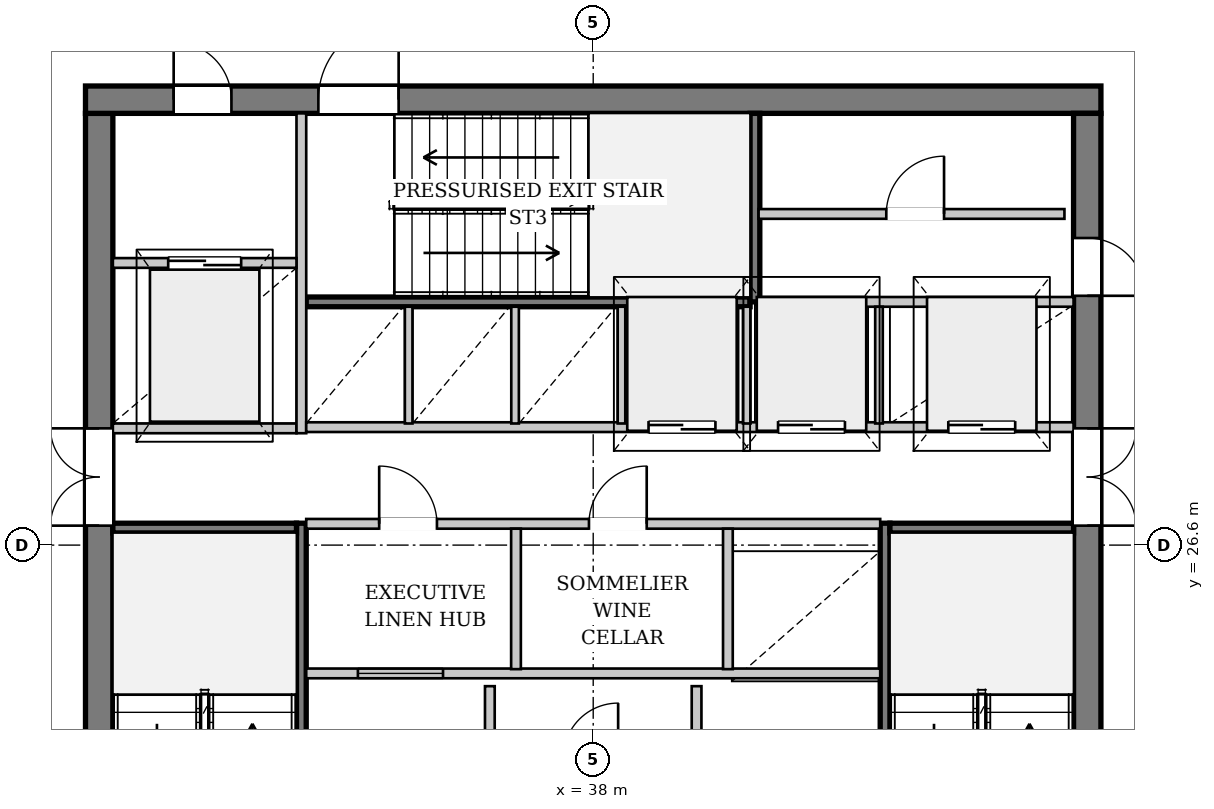
"""IFC4 building model, lengths in metres.
Left out: names, types, materials, properties, quantities, classifications, styles, units other than length and angle.
Written with IfcOpenShell. Run it as: python <this file> out.ifc"""

import sys

from ifc_helpers import new_model, si_unit, direction, frame, frame_2d, origin, place, context, subcontext, project, spatial, rectangle, extrude, source, transform, mapped, element, fill, save


model = new_model("IFC4")
c1 = context("Model", 3, precision=1e-05, world=origin(), true_north=direction((0.0, 1.0)))
c2 = subcontext(c1, "Body", "Model", "MODEL_VIEW")
j1 = project(units=[si_unit("LENGTHUNIT", "METRE"), si_unit("PLANEANGLEUNIT", "RADIAN")], contexts=[c1])
p1 = place(None, origin())
s1 = spatial("IfcSite", under=j1, at=p1, CompositionType="ELEMENT")
p2 = place(p1, origin())
s2 = spatial("IfcBuilding", under=s1, at=p2, CompositionType="ELEMENT")
p3 = place(p2, frame((0.0, 0.0, 277.7)))
s3 = spatial("IfcBuildingStorey", under=s2, at=p3, CompositionType="ELEMENT", Elevation=277.7)
p4 = place(p3, frame((50.997, 27.672, 0.0), z_axis=(0.0, 0.0, 1.0), x_axis=(-0.184819886047, -0.982772409931, 0.0)))
e1 = element("IfcWall", 1, at=p4, inside=s3, PredefinedType="SOLIDWALL", context=c2, shape_type="SweptSolid", body=[
    extrude(rectangle(XDim=22.053, YDim=0.32, at=frame_2d((11.027, 0.0))), origin(), (0.0, 0.0, 1.0), 3.462),
])
p5 = place(p4, frame((6.307, 0.0, 0.0)))
e2 = element("IfcOpeningElement", 2, at=p5, cuts=e1, PredefinedType="OPENING", context=c2, shape_type="SweptSolid", body=[
    extrude(rectangle(XDim=1.5, YDim=2.3, at=frame_2d((0.75, 1.15))), frame((0.0, 0.17, 0.0), z_axis=(0.0, -1.0, 0.0), x_axis=(1.0, 0.0, 0.0)), (0.0, 0.0, 1.0), 0.34),
])
p6 = place(p4, frame((13.919, 0.0, 0.65)))
e3 = element("IfcOpeningElement", 3, at=p6, cuts=e1, PredefinedType="OPENING", context=c2, shape_type="SweptSolid", body=[
    extrude(rectangle(XDim=2.6, YDim=2.35, at=frame_2d((1.3, 1.175))), frame((0.0, 0.17, 0.0), z_axis=(0.0, -1.0, 0.0), x_axis=(1.0, 0.0, 0.0)), (0.0, 0.0, 1.0), 0.34),
])
p7 = place(p3, frame((29.875, 19.5, 0.0), z_axis=(0.0, 0.0, 1.0), x_axis=(0.0, 1.0, 0.0)))
e4 = element("IfcWall", 4, at=p7, inside=s3, PredefinedType="SHEAR", context=c2, shape_type="SweptSolid", body=[
    extrude(rectangle(XDim=14.2, YDim=0.45, at=frame_2d((7.1, 0.0))), origin(), (0.0, 0.0, 1.0), 3.92),
])
p8 = place(p7, frame((7.42, 0.0, 0.0)))
e5 = element("IfcOpeningElement", 5, at=p8, cuts=e4, PredefinedType="OPENING", context=c2, shape_type="SweptSolid", body=[
    extrude(rectangle(XDim=1.6, YDim=2.2, at=frame_2d((0.8, 1.1))), frame((0.0, 0.235, 0.0), z_axis=(0.0, -1.0, 0.0), x_axis=(1.0, 0.0, 0.0)), (0.0, 0.0, 1.0), 0.47),
])
p9 = place(p3, frame((29.65, 33.925, 0.0), z_axis=(0.0, 0.0, 1.0), x_axis=(1.0, 0.0, 0.0)))
e6 = element("IfcWall", 6, at=p9, inside=s3, PredefinedType="SHEAR", context=c2, shape_type="SweptSolid", body=[
    extrude(rectangle(XDim=16.7, YDim=0.45, at=frame_2d((8.35, 0.0))), origin(), (0.0, 0.0, 1.0), 3.92),
])
p10 = place(p9, frame((1.45, 0.0, 0.0)))
e7 = element("IfcOpeningElement", 7, at=p10, cuts=e6, PredefinedType="OPENING", context=c2, shape_type="SweptSolid", body=[
    extrude(rectangle(XDim=0.95, YDim=2.1, at=frame_2d((0.475, 1.05))), frame((0.0, 0.235, 0.0), z_axis=(0.0, -1.0, 0.0), x_axis=(1.0, 0.0, 0.0)), (0.0, 0.0, 1.0), 0.47),
])
p11 = place(p9, frame((3.83, 0.0, 0.0)))
e8 = element("IfcOpeningElement", 8, at=p11, cuts=e6, PredefinedType="OPENING", context=c2, shape_type="SweptSolid", body=[
    extrude(rectangle(XDim=1.32, YDim=2.2, at=frame_2d((0.66, 1.1))), frame((0.0, 0.235, 0.0), z_axis=(0.0, -1.0, 0.0), x_axis=(1.0, 0.0, 0.0)), (0.0, 0.0, 1.0), 0.47),
])
p12 = place(p3, frame((46.125, 33.7, 0.0), z_axis=(0.0, 0.0, 1.0), x_axis=(0.0, -1.0, 0.0)))
e9 = element("IfcWall", 9, at=p12, inside=s3, PredefinedType="SHEAR", context=c2, shape_type="SweptSolid", body=[
    extrude(rectangle(XDim=14.2, YDim=0.45, at=frame_2d((7.1, 0.0))), origin(), (0.0, 0.0, 1.0), 3.92),
])
p13 = place(p12, frame((5.18, 0.0, 0.0)))
e10 = element("IfcOpeningElement", 10, at=p13, cuts=e9, PredefinedType="OPENING", context=c2, shape_type="SweptSolid", body=[
    extrude(rectangle(XDim=1.6, YDim=2.2, at=frame_2d((0.8, 1.1))), frame((0.0, 0.235, 0.0), z_axis=(0.0, -1.0, 0.0), x_axis=(1.0, 0.0, 0.0)), (0.0, 0.0, 1.0), 0.47),
])
p14 = place(p12, frame((2.05, 0.0, 0.0)))
e11 = element("IfcOpeningElement", 11, at=p14, cuts=e9, PredefinedType="OPENING", context=c2, shape_type="SweptSolid", body=[
    extrude(rectangle(XDim=0.95, YDim=2.1, at=frame_2d((0.475, 1.05))), frame((0.0, 0.235, 0.0), z_axis=(0.0, -1.0, 0.0), x_axis=(1.0, 0.0, 0.0)), (0.0, 0.0, 1.0), 0.47),
])
p15 = place(p3, frame((33.2, 19.5, 0.0), z_axis=(0.0, 0.0, 1.0), x_axis=(0.0, 1.0, 0.0)))
e12 = element("IfcWall", 12, at=p15, inside=s3, PredefinedType="PARTITIONING", context=c2, shape_type="SweptSolid", body=[
    extrude(rectangle(XDim=7.46, YDim=0.16, at=frame_2d((3.73, 0.0))), origin(), (0.0, 0.0, 1.0), 3.92),
])
p16 = place(p15, frame((0.08, 0.0, 0.0)))
e13 = element("IfcOpeningElement", 13, at=p16, cuts=e12, PredefinedType="OPENING", context=c2, shape_type="SweptSolid", body=[
    extrude(rectangle(XDim=1.32, YDim=2.2, at=frame_2d((0.66, 1.1))), frame((0.0, 0.09, 0.0), z_axis=(0.0, -1.0, 0.0), x_axis=(1.0, 0.0, 0.0)), (0.0, 0.0, 1.0), 0.18),
])
p17 = place(p3, frame((30.1, 26.88, 0.0), z_axis=(0.0, 0.0, 1.0), x_axis=(1.0, 0.0, 0.0)))
e14 = element("IfcWall", 14, at=p17, inside=s3, PredefinedType="PARTITIONING", context=c2, shape_type="SweptSolid", body=[
    extrude(rectangle(XDim=3.02, YDim=0.16, at=frame_2d((1.51, 0.0))), origin(), (0.0, 0.0, 1.0), 3.92),
])
p18 = place(p3, frame((42.8, 26.96, 0.0), z_axis=(0.0, 0.0, 1.0), x_axis=(0.0, -1.0, 0.0)))
e15 = element("IfcWall", 15, at=p18, inside=s3, PredefinedType="PARTITIONING", context=c2, shape_type="SweptSolid", body=[
    extrude(rectangle(XDim=7.46, YDim=0.16, at=frame_2d((3.73, 0.0))), origin(), (0.0, 0.0, 1.0), 3.92),
])
p19 = place(p18, frame((6.06, 0.0, 0.0)))
e16 = element("IfcOpeningElement", 16, at=p19, cuts=e15, PredefinedType="OPENING", context=c2, shape_type="SweptSolid", body=[
    extrude(rectangle(XDim=1.32, YDim=2.2, at=frame_2d((0.66, 1.1))), frame((0.0, 0.09, 0.0), z_axis=(0.0, -1.0, 0.0), x_axis=(1.0, 0.0, 0.0)), (0.0, 0.0, 1.0), 0.18),
])
p20 = place(p3, frame((42.88, 26.88, 0.0), z_axis=(0.0, 0.0, 1.0), x_axis=(1.0, 0.0, 0.0)))
e17 = element("IfcWall", 17, at=p20, inside=s3, PredefinedType="PARTITIONING", context=c2, shape_type="SweptSolid", body=[
    extrude(rectangle(XDim=3.02, YDim=0.16, at=frame_2d((1.51, 0.0))), origin(), (0.0, 0.0, 1.0), 3.92),
])
p21 = place(p3, frame((33.28, 30.6, 0.0), z_axis=(0.0, 0.0, 1.0), x_axis=(1.0, 0.0, 0.0)))
e18 = element("IfcWall", 18, at=p21, inside=s3, PredefinedType="PARTITIONING", context=c2, shape_type="SweptSolid", body=[
    extrude(rectangle(XDim=7.3, YDim=0.16, at=frame_2d((3.65, 0.0))), origin(), (0.0, 0.0, 1.0), 3.92),
])
p22 = place(p3, frame((40.66, 30.6, 0.0), z_axis=(0.0, 0.0, 1.0), x_axis=(0.0, 1.0, 0.0)))
e19 = element("IfcWall", 19, at=p22, inside=s3, PredefinedType="PARTITIONING", context=c2, shape_type="SweptSolid", body=[
    extrude(rectangle(XDim=3.1, YDim=0.16, at=frame_2d((1.55, 0.0))), origin(), (0.0, 0.0, 1.0), 3.92),
])
p23 = place(p3, frame((36.3, 19.5, 0.0), z_axis=(0.0, 0.0, 1.0), x_axis=(0.0, 1.0, 0.0)))
e20 = element("IfcWall", 20, at=p23, inside=s3, PredefinedType="PARTITIONING", context=c2, shape_type="SweptSolid", body=[
    extrude(rectangle(XDim=4.78, YDim=0.16, at=frame_2d((2.39, 0.0))), origin(), (0.0, 0.0, 1.0), 3.92),
])
p24 = place(p23, frame((0.6, 0.0, 0.0)))
e21 = element("IfcOpeningElement", 21, at=p24, cuts=e20, PredefinedType="OPENING", context=c2, shape_type="SweptSolid", body=[
    extrude(rectangle(XDim=1.2, YDim=2.2, at=frame_2d((0.6, 1.1))), frame((0.0, 0.09, 0.0), z_axis=(0.0, -1.0, 0.0), x_axis=(1.0, 0.0, 0.0)), (0.0, 0.0, 1.0), 0.18),
])
p25 = place(p23, frame((2.65, 0.0, 0.0)))
e22 = element("IfcOpeningElement", 22, at=p25, cuts=e20, PredefinedType="OPENING", context=c2, shape_type="SweptSolid", body=[
    extrude(rectangle(XDim=0.95, YDim=2.1, at=frame_2d((0.475, 1.05))), frame((0.0, 0.09, 0.0), z_axis=(0.0, -1.0, 0.0), x_axis=(1.0, 0.0, 0.0)), (0.0, 0.0, 1.0), 0.18),
])
p26 = place(p3, frame((39.7, 24.28, 0.0), z_axis=(0.0, 0.0, 1.0), x_axis=(0.0, -1.0, 0.0)))
e23 = element("IfcWall", 23, at=p26, inside=s3, PredefinedType="PARTITIONING", context=c2, shape_type="SweptSolid", body=[
    extrude(rectangle(XDim=4.78, YDim=0.16, at=frame_2d((2.39, 0.0))), origin(), (0.0, 0.0, 1.0), 3.92),
])
p27 = place(p26, frame((3.12, 0.0, 0.0)))
e24 = element("IfcOpeningElement", 24, at=p27, cuts=e23, PredefinedType="OPENING", context=c2, shape_type="SweptSolid", body=[
    extrude(rectangle(XDim=1.2, YDim=2.2, at=frame_2d((0.6, 1.1))), frame((0.0, 0.09, 0.0), z_axis=(0.0, -1.0, 0.0), x_axis=(1.0, 0.0, 0.0)), (0.0, 0.0, 1.0), 0.18),
])
p28 = place(p3, frame((33.28, 24.49, 0.0), z_axis=(0.0, 0.0, 1.0), x_axis=(1.0, 0.0, 0.0)))
e25 = element("IfcWall", 25, at=p28, inside=s3, PredefinedType="PARTITIONING", context=c2, shape_type="SweptSolid", body=[
    extrude(rectangle(XDim=9.44, YDim=0.16, at=frame_2d((4.72, 0.0))), origin(), (0.0, 0.0, 1.0), 3.92),
])
p29 = place(p28, frame((0.85, 0.0, 0.95)))
e26 = element("IfcOpeningElement", 26, at=p29, cuts=e25, PredefinedType="OPENING", context=c2, shape_type="SweptSolid", body=[
    extrude(rectangle(XDim=1.4, YDim=1.8, at=frame_2d((0.7, 0.9))), frame((0.0, 0.09, 0.0), z_axis=(0.0, -1.0, 0.0), x_axis=(1.0, 0.0, 0.0)), (0.0, 0.0, 1.0), 0.18),
])
p30 = place(p3, frame((30.1, 28.52, 0.0), z_axis=(0.0, 0.0, 1.0), x_axis=(1.0, 0.0, 0.0)))
e27 = element("IfcWall", 27, at=p30, inside=s3, PredefinedType="PARTITIONING", context=c2, shape_type="SweptSolid", body=[
    extrude(rectangle(XDim=3.02, YDim=0.16, at=frame_2d((1.51, 0.0))), origin(), (0.0, 0.0, 1.0), 3.92),
])
p31 = place(p3, frame((33.2, 28.44, 0.0), z_axis=(0.0, 0.0, 1.0), x_axis=(0.0, 1.0, 0.0)))
e28 = element("IfcWall", 28, at=p31, inside=s3, PredefinedType="PARTITIONING", context=c2, shape_type="SweptSolid", body=[
    extrude(rectangle(XDim=5.26, YDim=0.16, at=frame_2d((2.63, 0.0))), origin(), (0.0, 0.0, 1.0), 3.92),
])
p32 = place(p3, frame((30.1, 31.24, 0.0), z_axis=(0.0, 0.0, 1.0), x_axis=(1.0, 0.0, 0.0)))
e29 = element("IfcWall", 29, at=p32, inside=s3, PredefinedType="PARTITIONING", context=c2, shape_type="SweptSolid", body=[
    extrude(rectangle(XDim=3.02, YDim=0.16, at=frame_2d((1.51, 0.0))), origin(), (0.0, 0.0, 1.0), 3.92),
])
p33 = place(p32, frame((0.91, 0.0, 0.0)))
e30 = element("IfcOpeningElement", 30, at=p33, cuts=e29, PredefinedType="OPENING", context=c2, shape_type="SweptSolid", body=[
    extrude(rectangle(XDim=1.2, YDim=2.2, at=frame_2d((0.6, 1.1))), frame((0.0, 0.09, 0.0), z_axis=(0.0, -1.0, 0.0), x_axis=(1.0, 0.0, 0.0)), (0.0, 0.0, 1.0), 0.18),
])
p34 = place(p3, frame((33.28, 26.95, 0.0), z_axis=(0.0, 0.0, 1.0), x_axis=(1.0, 0.0, 0.0)))
e31 = element("IfcWall", 31, at=p34, inside=s3, PredefinedType="PARTITIONING", context=c2, shape_type="SweptSolid", body=[
    extrude(rectangle(XDim=9.44, YDim=0.16, at=frame_2d((4.72, 0.0))), origin(), (0.0, 0.0, 1.0), 3.92),
])
p35 = place(p34, frame((1.2, 0.0, 0.0)))
e32 = element("IfcOpeningElement", 32, at=p35, cuts=e31, PredefinedType="OPENING", context=c2, shape_type="SweptSolid", body=[
    extrude(rectangle(XDim=0.95, YDim=2.1, at=frame_2d((0.475, 1.05))), frame((0.0, 0.09, 0.0), z_axis=(0.0, -1.0, 0.0), x_axis=(1.0, 0.0, 0.0)), (0.0, 0.0, 1.0), 0.18),
])
p36 = place(p34, frame((4.65, 0.0, 0.0)))
e33 = element("IfcOpeningElement", 33, at=p36, cuts=e31, PredefinedType="OPENING", context=c2, shape_type="SweptSolid", body=[
    extrude(rectangle(XDim=0.95, YDim=2.1, at=frame_2d((0.475, 1.05))), frame((0.0, 0.09, 0.0), z_axis=(0.0, -1.0, 0.0), x_axis=(1.0, 0.0, 0.0)), (0.0, 0.0, 1.0), 0.18),
])
for number, where, z_axis, x_axis in (
    (34, (36.73, 24.56, 0.0), (0.0, 0.0, 1.0), (0.0, 1.0, 0.0)),
    (35, (40.215, 24.56, 0.0), (0.0, 0.0, 1.0), (0.0, 1.0, 0.0)),
):
    element("IfcWall", number, at=place(p3, frame(where, z_axis=z_axis, x_axis=x_axis)), inside=s3, PredefinedType="PARTITIONING", context=c2, shape_type="SweptSolid", body=[
        extrude(rectangle(XDim=2.31, YDim=0.16, at=frame_2d((1.155, 0.0))), origin(), (0.0, 0.0, 1.0), 3.92),
    ])
p37 = place(p3, frame((33.28, 28.54, 0.0), z_axis=(0.0, 0.0, 1.0), x_axis=(1.0, 0.0, 0.0)))
e36 = element("IfcWall", 36, at=p37, inside=s3, PredefinedType="PARTITIONING", context=c2, shape_type="SweptSolid", body=[
    extrude(rectangle(XDim=12.62, YDim=0.16, at=frame_2d((6.31, 0.0))), origin(), (0.0, 0.0, 1.0), 3.92),
])
p38 = place(p37, frame((5.63, 0.0, 0.0)))
e37 = element("IfcOpeningElement", 37, at=p38, cuts=e36, PredefinedType="OPENING", context=c2, shape_type="SweptSolid", body=[
    extrude(rectangle(XDim=1.1, YDim=2.2, at=frame_2d((0.55, 1.1))), frame((0.0, 0.09, 0.0), z_axis=(0.0, -1.0, 0.0), x_axis=(1.0, 0.0, 0.0)), (0.0, 0.0, 1.0), 0.18),
])
p39 = place(p37, frame((7.76, 0.0, 0.0)))
e38 = element("IfcOpeningElement", 38, at=p39, cuts=e36, PredefinedType="OPENING", context=c2, shape_type="SweptSolid", body=[
    extrude(rectangle(XDim=1.1, YDim=2.2, at=frame_2d((0.55, 1.1))), frame((0.0, 0.09, 0.0), z_axis=(0.0, -1.0, 0.0), x_axis=(1.0, 0.0, 0.0)), (0.0, 0.0, 1.0), 0.18),
])
p40 = place(p37, frame((10.56, 0.0, 0.0)))
e39 = element("IfcOpeningElement", 39, at=p40, cuts=e36, PredefinedType="OPENING", context=c2, shape_type="SweptSolid", body=[
    extrude(rectangle(XDim=1.1, YDim=2.2, at=frame_2d((0.55, 1.1))), frame((0.0, 0.09, 0.0), z_axis=(0.0, -1.0, 0.0), x_axis=(1.0, 0.0, 0.0)), (0.0, 0.0, 1.0), 0.18),
])
p41 = place(p3, frame((40.72, 30.6, 0.0), z_axis=(0.0, 0.0, 1.0), x_axis=(1.0, 0.0, 0.0)))
e40 = element("IfcWall", 40, at=p41, inside=s3, PredefinedType="PARTITIONING", context=c2, shape_type="SweptSolid", body=[
    extrude(rectangle(XDim=5.18, YDim=0.16, at=frame_2d((2.59, 0.0))), origin(), (0.0, 0.0, 1.0), 3.92),
])
for number, where, z_axis, x_axis in (
    (41, (34.965, 28.6, 0.0), (0.0, 0.0, 1.0), (0.0, 1.0, 0.0)),
    (42, (36.715, 28.6, 0.0), (0.0, 0.0, 1.0), (0.0, 1.0, 0.0)),
    (43, (38.465, 28.6, 0.0), (0.0, 0.0, 1.0), (0.0, 1.0, 0.0)),
    (44, (40.525, 28.6, 0.0), (0.0, 0.0, 1.0), (0.0, 1.0, 0.0)),
    (45, (42.7, 28.6, 0.0), (0.0, 0.0, 1.0), (0.0, 1.0, 0.0)),
):
    element("IfcWall", number, at=place(p3, frame(where, z_axis=z_axis, x_axis=x_axis)), inside=s3, PredefinedType="PARTITIONING", context=c2, shape_type="SweptSolid", body=[
        extrude(rectangle(XDim=1.92, YDim=0.125, at=frame_2d((0.96, 0.0))), origin(), (0.0, 0.0, 1.0), 3.92),
    ])
p42 = place(p3, frame((40.72, 32.046, 0.0), z_axis=(0.0, 0.0, 1.0), x_axis=(1.0, 0.0, 0.0)))
e46 = element("IfcWall", 46, at=p42, inside=s3, PredefinedType="PARTITIONING", context=c2, shape_type="SweptSolid", body=[
    extrude(rectangle(XDim=5.03, YDim=0.16, at=frame_2d((2.515, 0.0))), origin(), (0.0, 0.0, 1.0), 3.92),
])
p43 = place(p42, frame((2.1, 0.0, 0.0)))
e47 = element("IfcOpeningElement", 47, at=p43, cuts=e46, PredefinedType="OPENING", context=c2, shape_type="SweptSolid", body=[
    extrude(rectangle(XDim=0.95, YDim=2.1, at=frame_2d((0.475, 1.05))), frame((0.0, 0.09, 0.0), z_axis=(0.0, -1.0, 0.0), x_axis=(1.0, 0.0, 0.0)), (0.0, 0.0, 1.0), 0.18),
])
m1 = source(origin(), c2, "Body", "SweptSolid", [
    extrude(rectangle(XDim=1.6, YDim=2.2, at=frame_2d((0.8, 1.1))), frame((0.0, 0.025, 0.0), z_axis=(0.0, -1.0, 0.0), x_axis=(1.0, 0.0, 0.0)), (0.0, 0.0, 1.0), 0.05),
])
p44 = place(p8, origin())
e48 = element("IfcDoor", 48, at=p44, inside=s3, OperationType="DOUBLE_DOOR_SINGLE_SWING", PredefinedType="DOOR", context=c2, shape_type="MappedRepresentation", body=[
    mapped(m1, transform((0.0, 0.0, 0.0), x_axis=(1.0, 0.0, 0.0), y_axis=(0.0, 1.0, 0.0), z_axis=(0.0, 0.0, 1.0), scale=1.0)),
])
fill(e5, e48)
m2 = source(origin(), c2, "Body", "SweptSolid", [
    extrude(rectangle(XDim=0.95, YDim=2.1, at=frame_2d((0.475, 1.05))), frame((0.0, 0.025, 0.0), z_axis=(0.0, -1.0, 0.0), x_axis=(1.0, 0.0, 0.0)), (0.0, 0.0, 1.0), 0.05),
])
p45 = place(p10, origin())
e49 = element("IfcDoor", 49, at=p45, inside=s3, OperationType="SINGLE_SWING_LEFT", PredefinedType="DOOR", context=c2, shape_type="MappedRepresentation", body=[
    mapped(m2, transform((0.0, 0.0, 0.0), x_axis=(1.0, 0.0, 0.0), y_axis=(0.0, 1.0, 0.0), z_axis=(0.0, 0.0, 1.0), scale=1.0)),
])
fill(e7, e49)
m3 = source(origin(), c2, "Body", "SweptSolid", [
    extrude(rectangle(XDim=1.32, YDim=2.2, at=frame_2d((0.66, 1.1))), frame((0.0, 0.025, 0.0), z_axis=(0.0, -1.0, 0.0), x_axis=(1.0, 0.0, 0.0)), (0.0, 0.0, 1.0), 0.05),
])
p46 = place(p11, origin())
e50 = element("IfcDoor", 50, at=p46, inside=s3, OperationType="SINGLE_SWING_RIGHT", PredefinedType="DOOR", context=c2, shape_type="MappedRepresentation", body=[
    mapped(m3, transform((0.0, 0.0, 0.0), x_axis=(1.0, 0.0, 0.0), y_axis=(0.0, 1.0, 0.0), z_axis=(0.0, 0.0, 1.0), scale=1.0)),
])
fill(e8, e50)
p47 = place(p13, origin())
e51 = element("IfcDoor", 51, at=p47, inside=s3, OperationType="DOUBLE_DOOR_SINGLE_SWING", PredefinedType="DOOR", context=c2, shape_type="MappedRepresentation", body=[
    mapped(m1, transform((0.0, 0.0, 0.0), x_axis=(1.0, 0.0, 0.0), y_axis=(0.0, 1.0, 0.0), z_axis=(0.0, 0.0, 1.0), scale=1.0)),
])
fill(e10, e51)
m4 = source(origin(), c2, "Body", "SweptSolid", [
    extrude(rectangle(XDim=1.2, YDim=2.2, at=frame_2d((0.6, 1.1))), frame((0.0, 0.025, 0.0), z_axis=(0.0, -1.0, 0.0), x_axis=(1.0, 0.0, 0.0)), (0.0, 0.0, 1.0), 0.05),
])
p48 = place(p33, origin())
e52 = element("IfcDoor", 52, at=p48, inside=s3, OperationType="DOUBLE_DOOR_SLIDING", PredefinedType="DOOR", context=c2, shape_type="MappedRepresentation", body=[
    mapped(m4, transform((0.0, 0.0, 0.0), x_axis=(1.0, 0.0, 0.0), y_axis=(0.0, 1.0, 0.0), z_axis=(0.0, 0.0, 1.0), scale=1.0)),
])
fill(e30, e52)
p49 = place(p35, origin())
e53 = element("IfcDoor", 53, at=p49, inside=s3, OperationType="SINGLE_SWING_LEFT", PredefinedType="DOOR", context=c2, shape_type="MappedRepresentation", body=[
    mapped(m2, transform((0.0, 0.0, 0.0), x_axis=(1.0, 0.0, 0.0), y_axis=(0.0, 1.0, 0.0), z_axis=(0.0, 0.0, 1.0), scale=1.0)),
])
fill(e32, e53)
p50 = place(p36, origin())
e54 = element("IfcDoor", 54, at=p50, inside=s3, OperationType="SINGLE_SWING_RIGHT", PredefinedType="DOOR", context=c2, shape_type="MappedRepresentation", body=[
    mapped(m2, transform((0.0, 0.0, 0.0), x_axis=(1.0, 0.0, 0.0), y_axis=(0.0, 1.0, 0.0), z_axis=(0.0, 0.0, 1.0), scale=1.0)),
])
fill(e33, e54)
m5 = source(origin(), c2, "Body", "SweptSolid", [
    extrude(rectangle(XDim=1.1, YDim=2.2, at=frame_2d((0.55, 1.1))), frame((0.0, 0.025, 0.0), z_axis=(0.0, -1.0, 0.0), x_axis=(1.0, 0.0, 0.0)), (0.0, 0.0, 1.0), 0.05),
])
p51 = place(p38, origin())
e55 = element("IfcDoor", 55, at=p51, inside=s3, OperationType="DOUBLE_DOOR_SLIDING", PredefinedType="DOOR", context=c2, shape_type="MappedRepresentation", body=[
    mapped(m5, transform((0.0, 0.0, 0.0), x_axis=(1.0, 0.0, 0.0), y_axis=(0.0, 1.0, 0.0), z_axis=(0.0, 0.0, 1.0), scale=1.0)),
])
fill(e37, e55)
p52 = place(p39, origin())
e56 = element("IfcDoor", 56, at=p52, inside=s3, OperationType="DOUBLE_DOOR_SLIDING", PredefinedType="DOOR", context=c2, shape_type="MappedRepresentation", body=[
    mapped(m5, transform((0.0, 0.0, 0.0), x_axis=(1.0, 0.0, 0.0), y_axis=(0.0, 1.0, 0.0), z_axis=(0.0, 0.0, 1.0), scale=1.0)),
])
fill(e38, e56)
p53 = place(p40, origin())
e57 = element("IfcDoor", 57, at=p53, inside=s3, OperationType="DOUBLE_DOOR_SLIDING", PredefinedType="DOOR", context=c2, shape_type="MappedRepresentation", body=[
    mapped(m5, transform((0.0, 0.0, 0.0), x_axis=(1.0, 0.0, 0.0), y_axis=(0.0, 1.0, 0.0), z_axis=(0.0, 0.0, 1.0), scale=1.0)),
])
fill(e39, e57)
p54 = place(p43, origin())
e58 = element("IfcDoor", 58, at=p54, inside=s3, OperationType="SINGLE_SWING_RIGHT", PredefinedType="DOOR", context=c2, shape_type="MappedRepresentation", body=[
    mapped(m2, transform((0.0, 0.0, 0.0), x_axis=(1.0, 0.0, 0.0), y_axis=(0.0, 1.0, 0.0), z_axis=(0.0, 0.0, 1.0), scale=1.0)),
])
fill(e47, e58)
p55 = place(p14, origin())
e59 = element("IfcDoor", 59, at=p55, inside=s3, OperationType="SINGLE_SWING_RIGHT", PredefinedType="DOOR", context=c2, shape_type="MappedRepresentation", body=[
    mapped(m2, transform((0.0, 0.0, 0.0), x_axis=(1.0, 0.0, 0.0), y_axis=(0.0, 1.0, 0.0), z_axis=(0.0, 0.0, 1.0), scale=1.0)),
])
fill(e11, e59)
m6 = source(origin(), c2, "Body", "SweptSolid", [
    extrude(rectangle(XDim=1.4, YDim=1.8, at=frame_2d((0.7, 0.9))), frame((0.0, 0.03, 0.0), z_axis=(0.0, -1.0, 0.0), x_axis=(1.0, 0.0, 0.0)), (0.0, 0.0, 1.0), 0.06),
])
p56 = place(p29, origin())
e60 = element("IfcWindow", 60, at=p56, inside=s3, PartitioningType="SINGLE_PANEL", PredefinedType="WINDOW", context=c2, shape_type="MappedRepresentation", body=[
    mapped(m6, transform((0.0, 0.0, 0.0), x_axis=(1.0, 0.0, 0.0), y_axis=(0.0, 1.0, 0.0), z_axis=(0.0, 0.0, 1.0), scale=1.0)),
])
fill(e26, e60)
save(model, sys.argv[1])
